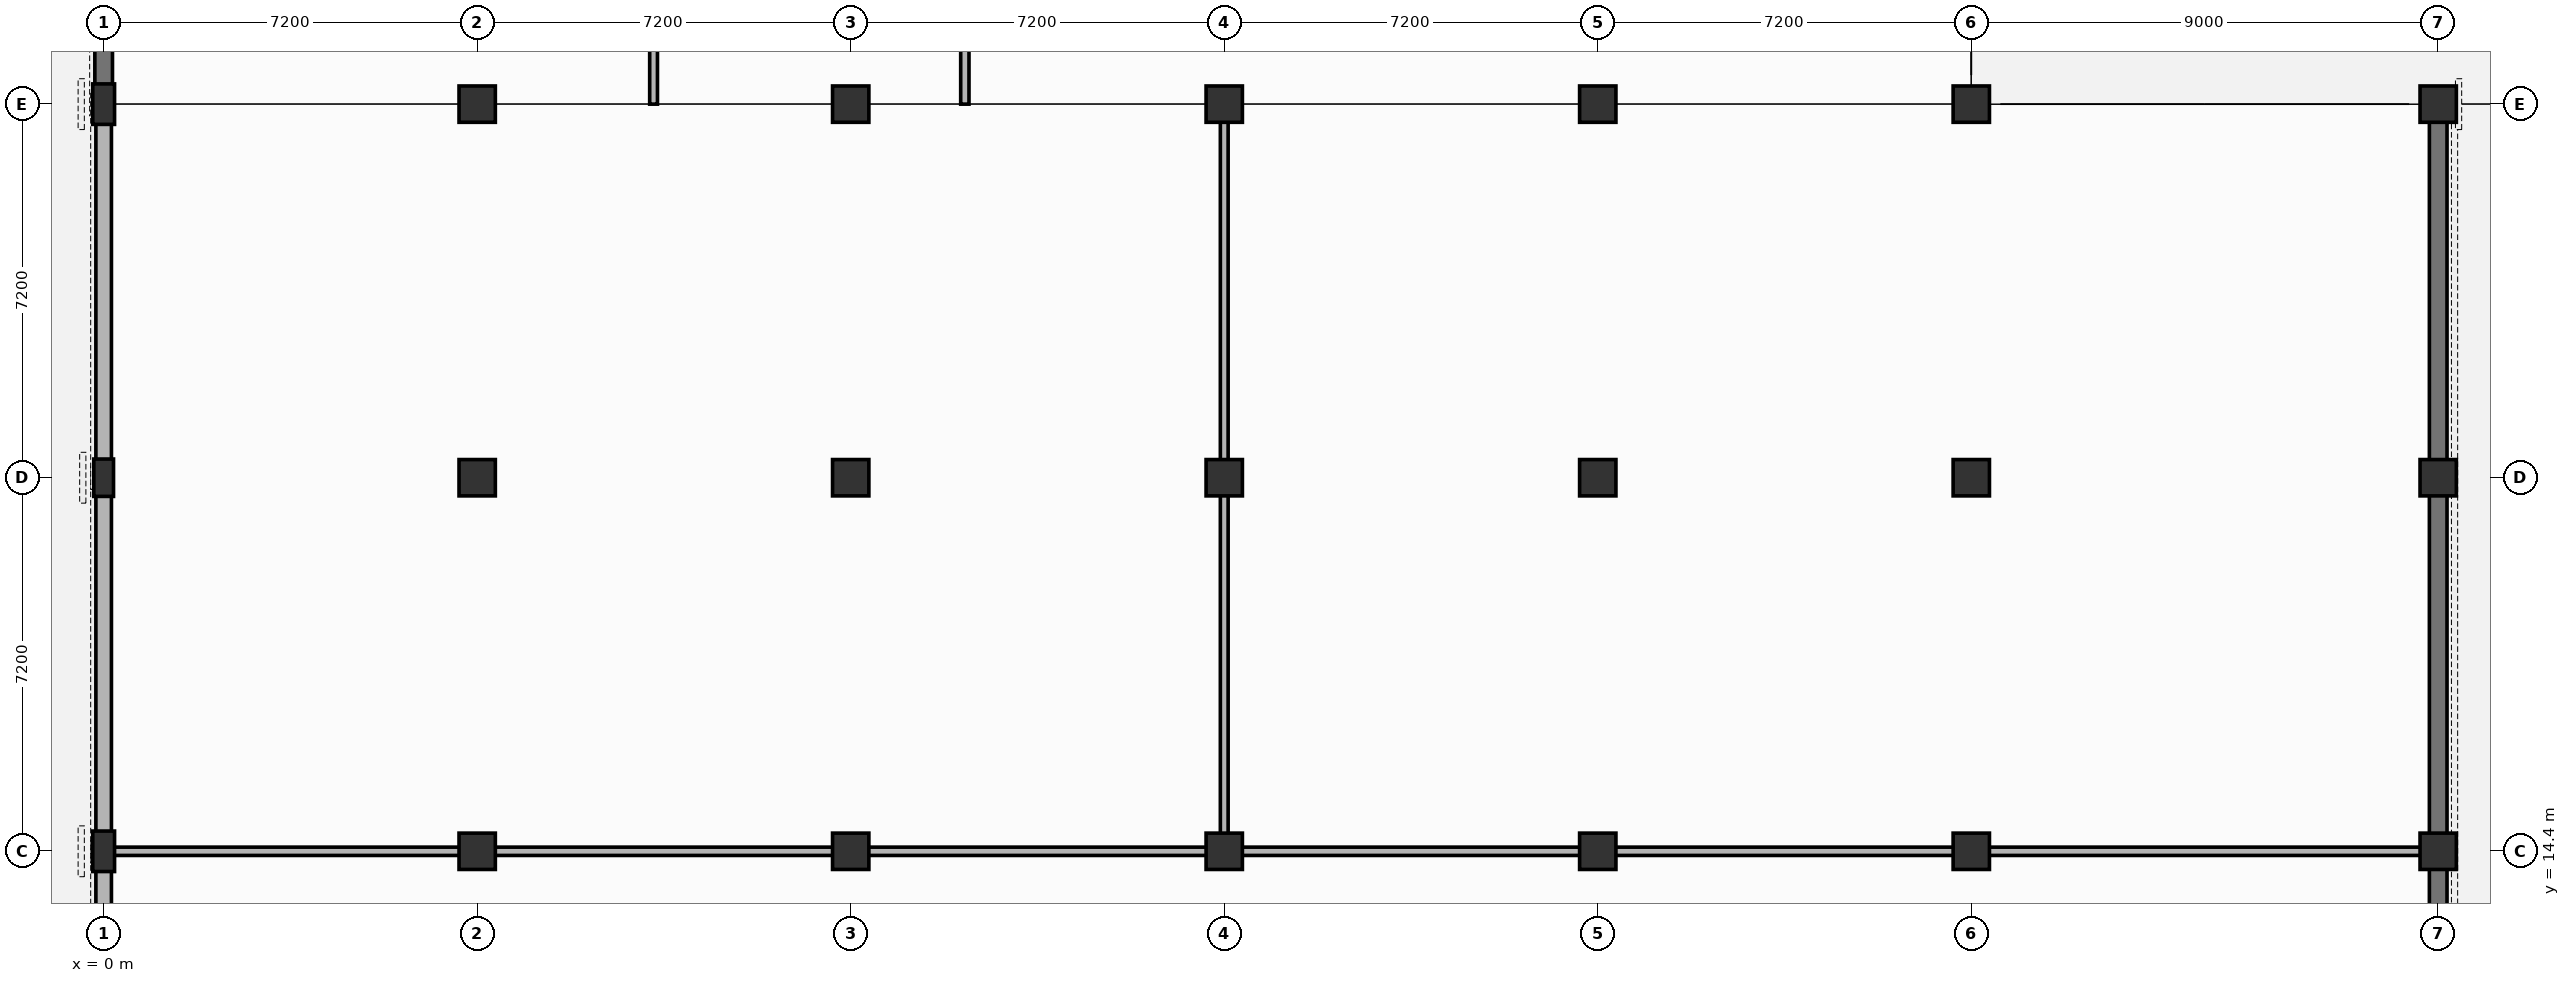
"""IFC4 building model, lengths in metres.
Left out: names, types, materials, properties, quantities, classifications, styles, units other than length and angle.
Written with IfcOpenShell. Run it as: python <this file> out.ifc"""

import sys

from ifc_helpers import new_model, si_unit, direction, frame, frame_2d, origin, origin_2d, place, context, subcontext, project, spatial, rectangle, extrude, element, fill, save


model = new_model("IFC4")
c1 = context("Model", 3, precision=1e-05, world=origin(), true_north=direction((0.0, 1.0)))
c2 = subcontext(c1, "Body", "Model", "MODEL_VIEW")
j1 = project(units=[si_unit("LENGTHUNIT", "METRE"), si_unit("PLANEANGLEUNIT", "RADIAN")], contexts=[c1])
p1 = place(None, origin())
s1 = spatial("IfcSite", under=j1, at=p1, CompositionType="ELEMENT")
p2 = place(p1, origin())
s2 = spatial("IfcBuilding", under=s1, at=p2, CompositionType="ELEMENT")
p3 = place(p2, origin())
s3 = spatial("IfcBuildingStorey", under=s2, at=p3, CompositionType="ELEMENT", Elevation=0.0)
p4 = place(p3, frame((0.0, 14.4, 0.0), z_axis=(0.0, 0.0, 1.0), x_axis=(1.0, 0.0, 0.0)))
e1 = element("IfcColumn", 1, at=p4, inside=s3, PredefinedType="PILASTER", context=c2, shape_type="SweptSolid", body=[
    extrude(rectangle(XDim=0.42, YDim=0.78, at=origin_2d()), origin(), (0.0, 0.0, 1.0), 5.1),
])
p5 = place(p3, frame((0.0, 21.6, 0.0), z_axis=(0.0, 0.0, 1.0), x_axis=(1.0, 0.0, 0.0)))
e2 = element("IfcColumn", 2, at=p5, inside=s3, PredefinedType="PILASTER", context=c2, shape_type="SweptSolid", body=[
    extrude(rectangle(XDim=0.38, YDim=0.72, at=origin_2d()), origin(), (0.0, 0.0, 1.0), 5.1),
])
p6 = place(p3, frame((0.0, 28.8, 0.0), z_axis=(0.0, 0.0, 1.0), x_axis=(1.0, 0.0, 0.0)))
e3 = element("IfcColumn", 3, at=p6, inside=s3, PredefinedType="PILASTER", context=c2, shape_type="SweptSolid", body=[
    extrude(rectangle(XDim=0.42, YDim=0.78, at=origin_2d()), origin(), (0.0, 0.0, 1.0), 5.1),
])
for number, where, z_axis, x_axis in (
    (4, (7.2, 14.4, 0.0), (0.0, 0.0, 1.0), (1.0, 0.0, 0.0)),
    (5, (7.2, 21.6, 0.0), (0.0, 0.0, 1.0), (1.0, 0.0, 0.0)),
    (6, (7.2, 28.8, 0.0), (0.0, 0.0, 1.0), (1.0, 0.0, 0.0)),
    (7, (14.4, 14.4, 0.0), (0.0, 0.0, 1.0), (1.0, 0.0, 0.0)),
    (8, (14.4, 21.6, 0.0), (0.0, 0.0, 1.0), (1.0, 0.0, 0.0)),
    (9, (14.4, 28.8, 0.0), (0.0, 0.0, 1.0), (1.0, 0.0, 0.0)),
    (10, (21.6, 14.4, 0.0), (0.0, 0.0, 1.0), (1.0, 0.0, 0.0)),
    (11, (21.6, 21.6, 0.0), (0.0, 0.0, 1.0), (1.0, 0.0, 0.0)),
    (12, (21.6, 28.8, 0.0), (0.0, 0.0, 1.0), (1.0, 0.0, 0.0)),
    (13, (28.8, 14.4, 0.0), (0.0, 0.0, 1.0), (1.0, 0.0, 0.0)),
    (14, (28.8, 21.6, 0.0), (0.0, 0.0, 1.0), (1.0, 0.0, 0.0)),
    (15, (28.8, 28.8, 0.0), (0.0, 0.0, 1.0), (1.0, 0.0, 0.0)),
    (16, (36.0, 14.4, 0.0), (0.0, 0.0, 1.0), (1.0, 0.0, 0.0)),
    (17, (36.0, 21.6, 0.0), (0.0, 0.0, 1.0), (1.0, 0.0, 0.0)),
    (18, (36.0, 28.8, 0.0), (0.0, 0.0, 1.0), (1.0, 0.0, 0.0)),
    (19, (45.0, 14.4, 0.0), (0.0, 0.0, 1.0), (1.0, 0.0, 0.0)),
    (20, (45.0, 21.6, 0.0), (0.0, 0.0, 1.0), (1.0, 0.0, 0.0)),
    (21, (45.0, 28.8, 0.0), (0.0, 0.0, 1.0), (1.0, 0.0, 0.0)),
):
    element("IfcColumn", number, at=place(p3, frame(where, z_axis=z_axis, x_axis=x_axis)), inside=s3, PredefinedType="COLUMN", context=c2, shape_type="SweptSolid", body=[
        extrude(rectangle(XDim=0.7, YDim=0.7, at=origin_2d()), origin(), (0.0, 0.0, 1.0), 5.1),
    ])
p7 = place(p3, frame((0.0, 28.8, 0.0), z_axis=(0.0, 0.0, 1.0), x_axis=(0.0, 1.0, 0.0)))
e22 = element("IfcWall", 22, at=p7, inside=s3, PredefinedType="SOLIDWALL", context=c2, shape_type="SweptSolid", body=[
    extrude(rectangle(XDim=7.2, YDim=0.34, at=frame_2d((3.6, 0.0))), origin(), (0.0, 0.0, 1.0), 4.8),
])
p8 = place(p7, frame((1.5, 0.0, 0.85)))
e23 = element("IfcOpeningElement", 23, at=p8, cuts=e22, PredefinedType="OPENING", context=c2, shape_type="SweptSolid", body=[
    extrude(rectangle(XDim=1.65, YDim=2.25, at=frame_2d((0.825, 1.125))), frame((0.0, 0.18, 0.0), z_axis=(0.0, -1.0, 0.0), x_axis=(1.0, 0.0, 0.0)), (0.0, 0.0, 1.0), 0.36),
])
p9 = place(p7, frame((4.3, 0.0, 0.85)))
e24 = element("IfcOpeningElement", 24, at=p9, cuts=e22, PredefinedType="OPENING", context=c2, shape_type="SweptSolid", body=[
    extrude(rectangle(XDim=1.65, YDim=2.25, at=frame_2d((0.825, 1.125))), frame((0.0, 0.18, 0.0), z_axis=(0.0, -1.0, 0.0), x_axis=(1.0, 0.0, 0.0)), (0.0, 0.0, 1.0), 0.36),
])
p10 = place(p3, frame((0.0, 7.2, 0.0), z_axis=(0.0, 0.0, 1.0), x_axis=(0.0, 1.0, 0.0)))
e25 = element("IfcWall", 25, at=p10, inside=s3, PredefinedType="SOLIDWALL", context=c2, shape_type="SweptSolid", body=[
    extrude(rectangle(XDim=7.2, YDim=0.3, at=frame_2d((3.6, 0.0))), origin(), (0.0, 0.0, 1.0), 4.115),
])
p11 = place(p10, frame((4.2, 0.0, 0.9)))
e26 = element("IfcOpeningElement", 26, at=p11, cuts=e25, PredefinedType="OPENING", context=c2, shape_type="SweptSolid", body=[
    extrude(rectangle(XDim=2.4, YDim=2.4, at=frame_2d((1.2, 1.2))), frame((0.0, 0.16, 0.0), z_axis=(0.0, -1.0, 0.0), x_axis=(1.0, 0.0, 0.0)), (0.0, 0.0, 1.0), 0.32),
])
p12 = place(p3, frame((0.0, 14.4, 0.0), z_axis=(0.0, 0.0, 1.0), x_axis=(0.0, 1.0, 0.0)))
e27 = element("IfcWall", 27, at=p12, inside=s3, PredefinedType="SOLIDWALL", context=c2, shape_type="SweptSolid", body=[
    extrude(rectangle(XDim=7.2, YDim=0.3, at=frame_2d((3.6, 0.0))), origin(), (0.0, 0.0, 1.0), 4.115),
])
p13 = place(p12, frame((2.0, 0.0, 0.9)))
e28 = element("IfcOpeningElement", 28, at=p13, cuts=e27, PredefinedType="OPENING", context=c2, shape_type="SweptSolid", body=[
    extrude(rectangle(XDim=2.4, YDim=2.4, at=frame_2d((1.2, 1.2))), frame((0.0, 0.16, 0.0), z_axis=(0.0, -1.0, 0.0), x_axis=(1.0, 0.0, 0.0)), (0.0, 0.0, 1.0), 0.32),
])
p14 = place(p3, frame((0.0, 21.6, 0.0), z_axis=(0.0, 0.0, 1.0), x_axis=(0.0, 1.0, 0.0)))
e29 = element("IfcWall", 29, at=p14, inside=s3, PredefinedType="SOLIDWALL", context=c2, shape_type="SweptSolid", body=[
    extrude(rectangle(XDim=7.2, YDim=0.3, at=frame_2d((3.6, 0.0))), origin(), (0.0, 0.0, 1.0), 4.115),
])
p15 = place(p14, frame((2.0, 0.0, 0.9)))
e30 = element("IfcOpeningElement", 30, at=p15, cuts=e29, PredefinedType="OPENING", context=c2, shape_type="SweptSolid", body=[
    extrude(rectangle(XDim=2.4, YDim=2.4, at=frame_2d((1.2, 1.2))), frame((0.0, 0.16, 0.0), z_axis=(0.0, -1.0, 0.0), x_axis=(1.0, 0.0, 0.0)), (0.0, 0.0, 1.0), 0.32),
])
p16 = place(p3, frame((45.0, 0.0, 0.0), z_axis=(0.0, 0.0, 1.0), x_axis=(0.0, 1.0, 0.0)))
e31 = element("IfcWall", 31, at=p16, inside=s3, PredefinedType="SOLIDWALL", context=c2, shape_type="SweptSolid", body=[
    extrude(rectangle(XDim=28.8, YDim=0.34, at=frame_2d((14.4, 0.0))), origin(), (0.0, 0.0, 1.0), 4.8),
])
p17 = place(p16, frame((18.5, 0.0, 0.0)))
e32 = element("IfcOpeningElement", 32, at=p17, cuts=e31, PredefinedType="OPENING", context=c2, shape_type="SweptSolid", body=[
    extrude(rectangle(XDim=1.6, YDim=2.4, at=frame_2d((0.8, 1.2))), frame((0.0, 0.18, 0.0), z_axis=(0.0, -1.0, 0.0), x_axis=(1.0, 0.0, 0.0)), (0.0, 0.0, 1.0), 0.36),
])
p18 = place(p16, frame((2.8, 0.0, 0.9)))
e33 = element("IfcOpeningElement", 33, at=p18, cuts=e31, PredefinedType="OPENING", context=c2, shape_type="SweptSolid", body=[
    extrude(rectangle(XDim=2.4, YDim=2.4, at=frame_2d((1.2, 1.2))), frame((0.0, 0.18, 0.0), z_axis=(0.0, -1.0, 0.0), x_axis=(1.0, 0.0, 0.0)), (0.0, 0.0, 1.0), 0.36),
])
p19 = place(p16, frame((15.2, 0.0, 0.9)))
e34 = element("IfcOpeningElement", 34, at=p19, cuts=e31, PredefinedType="OPENING", context=c2, shape_type="SweptSolid", body=[
    extrude(rectangle(XDim=1.6, YDim=2.05, at=frame_2d((0.8, 1.025))), frame((0.0, 0.18, 0.0), z_axis=(0.0, -1.0, 0.0), x_axis=(1.0, 0.0, 0.0)), (0.0, 0.0, 1.0), 0.36),
])
p20 = place(p3, frame((16.6, 28.8, 0.0), z_axis=(0.0, 0.0, 1.0), x_axis=(0.0, 1.0, 0.0)))
e35 = element("IfcWall", 35, at=p20, inside=s3, PredefinedType="PARTITIONING", context=c2, shape_type="SweptSolid", body=[
    extrude(rectangle(XDim=14.4, YDim=0.16, at=frame_2d((7.2, 0.0))), origin(), (0.0, 0.0, 1.0), 4.348),
])
p21 = place(p20, frame((6.4, 0.0, 0.0)))
e36 = element("IfcOpeningElement", 36, at=p21, cuts=e35, PredefinedType="OPENING", context=c2, shape_type="SweptSolid", body=[
    extrude(rectangle(XDim=1.6, YDim=2.2, at=frame_2d((0.8, 1.1))), frame((0.0, 0.09, 0.0), z_axis=(0.0, -1.0, 0.0), x_axis=(1.0, 0.0, 0.0)), (0.0, 0.0, 1.0), 0.18),
])
p22 = place(p3, frame((10.6, 28.8, 0.0), z_axis=(0.0, 0.0, 1.0), x_axis=(0.0, 1.0, 0.0)))
e37 = element("IfcWall", 37, at=p22, inside=s3, PredefinedType="PARTITIONING", context=c2, shape_type="SweptSolid", body=[
    extrude(rectangle(XDim=27.2, YDim=0.15, at=frame_2d((13.6, 0.0))), origin(), (0.0, 0.0, 1.0), 4.459),
])
p23 = place(p22, frame((11.0, 0.0, 0.0)))
e38 = element("IfcOpeningElement", 38, at=p23, cuts=e37, PredefinedType="OPENING", context=c2, shape_type="SweptSolid", body=[
    extrude(rectangle(XDim=1.0, YDim=2.15, at=frame_2d((0.5, 1.075))), frame((0.0, 0.085, 0.0), z_axis=(0.0, -1.0, 0.0), x_axis=(1.0, 0.0, 0.0)), (0.0, 0.0, 1.0), 0.17),
])
p24 = place(p3, frame((0.0, 14.4, 0.0), z_axis=(0.0, 0.0, 1.0), x_axis=(1.0, 0.0, 0.0)))
e39 = element("IfcWall", 39, at=p24, inside=s3, PredefinedType="PARTITIONING", context=c2, shape_type="SweptSolid", body=[
    extrude(rectangle(XDim=45.0, YDim=0.16, at=frame_2d((22.5, 0.0))), origin(), (0.0, 0.0, 1.0), 4.065),
])
p25 = place(p24, frame((10.0, 0.0, 0.0)))
e40 = element("IfcOpeningElement", 40, at=p25, cuts=e39, PredefinedType="OPENING", context=c2, shape_type="SweptSolid", body=[
    extrude(rectangle(XDim=1.6, YDim=2.2, at=frame_2d((0.8, 1.1))), frame((0.0, 0.09, 0.0), z_axis=(0.0, -1.0, 0.0), x_axis=(1.0, 0.0, 0.0)), (0.0, 0.0, 1.0), 0.18),
])
p26 = place(p24, frame((31.0, 0.0, 0.0)))
e41 = element("IfcOpeningElement", 41, at=p26, cuts=e39, PredefinedType="OPENING", context=c2, shape_type="SweptSolid", body=[
    extrude(rectangle(XDim=1.6, YDim=2.2, at=frame_2d((0.8, 1.1))), frame((0.0, 0.09, 0.0), z_axis=(0.0, -1.0, 0.0), x_axis=(1.0, 0.0, 0.0)), (0.0, 0.0, 1.0), 0.18),
])
p27 = place(p3, frame((21.6, 14.4, 0.0), z_axis=(0.0, 0.0, 1.0), x_axis=(0.0, 1.0, 0.0)))
e42 = element("IfcWall", 42, at=p27, inside=s3, PredefinedType="PARTITIONING", context=c2, shape_type="SweptSolid", body=[
    extrude(rectangle(XDim=14.4, YDim=0.15, at=frame_2d((7.2, 0.0))), origin(), (0.0, 0.0, 1.0), 4.015),
])
p28 = place(p11, origin())
e43 = element("IfcWindow", 43, at=p28, inside=s3, PartitioningType="SINGLE_PANEL", PredefinedType="WINDOW", context=c2, shape_type="SweptSolid", body=[
    extrude(rectangle(XDim=2.4, YDim=2.4, at=frame_2d((1.2, 1.2))), frame((0.0, 0.03, 0.0), z_axis=(0.0, -1.0, 0.0), x_axis=(1.0, 0.0, 0.0)), (0.0, 0.0, 1.0), 0.06),
])
fill(e26, e43)
p29 = place(p13, origin())
e44 = element("IfcWindow", 44, at=p29, inside=s3, PartitioningType="SINGLE_PANEL", PredefinedType="WINDOW", context=c2, shape_type="SweptSolid", body=[
    extrude(rectangle(XDim=2.4, YDim=2.4, at=frame_2d((1.2, 1.2))), frame((0.0, 0.03, 0.0), z_axis=(0.0, -1.0, 0.0), x_axis=(1.0, 0.0, 0.0)), (0.0, 0.0, 1.0), 0.06),
])
fill(e28, e44)
p30 = place(p15, origin())
e45 = element("IfcWindow", 45, at=p30, inside=s3, PartitioningType="SINGLE_PANEL", PredefinedType="WINDOW", context=c2, shape_type="SweptSolid", body=[
    extrude(rectangle(XDim=2.4, YDim=2.4, at=frame_2d((1.2, 1.2))), frame((0.0, 0.03, 0.0), z_axis=(0.0, -1.0, 0.0), x_axis=(1.0, 0.0, 0.0)), (0.0, 0.0, 1.0), 0.06),
])
fill(e30, e45)
p31 = place(p17, frame((1.6, 0.0, 0.0), z_axis=(0.0, 0.0, 1.0), x_axis=(-1.0, 0.0, 0.0)))
e46 = element("IfcDoor", 46, at=p31, inside=s3, OperationType="DOUBLE_DOOR_SINGLE_SWING", PredefinedType="DOOR", context=c2, shape_type="SweptSolid", body=[
    extrude(rectangle(XDim=1.6, YDim=2.4, at=frame_2d((0.8, 1.2))), frame((0.0, 0.025, 0.0), z_axis=(0.0, -1.0, 0.0), x_axis=(1.0, 0.0, 0.0)), (0.0, 0.0, 1.0), 0.05),
])
fill(e32, e46)
p32 = place(p19, origin())
e47 = element("IfcWindow", 47, at=p32, inside=s3, PartitioningType="SINGLE_PANEL", PredefinedType="WINDOW", context=c2, shape_type="SweptSolid", body=[
    extrude(rectangle(XDim=1.6, YDim=2.05, at=frame_2d((0.8, 1.025))), frame((0.0, 0.03, 0.0), z_axis=(0.0, -1.0, 0.0), x_axis=(1.0, 0.0, 0.0)), (0.0, 0.0, 1.0), 0.06),
])
fill(e34, e47)
p33 = place(p25, origin())
e48 = element("IfcDoor", 48, at=p33, inside=s3, OperationType="DOUBLE_DOOR_SINGLE_SWING", PredefinedType="DOOR", context=c2, shape_type="SweptSolid", body=[
    extrude(rectangle(XDim=1.6, YDim=2.2, at=frame_2d((0.8, 1.1))), frame((0.0, 0.025, 0.0), z_axis=(0.0, -1.0, 0.0), x_axis=(1.0, 0.0, 0.0)), (0.0, 0.0, 1.0), 0.05),
])
fill(e40, e48)
p34 = place(p26, origin())
e49 = element("IfcDoor", 49, at=p34, inside=s3, OperationType="DOUBLE_DOOR_SINGLE_SWING", PredefinedType="DOOR", context=c2, shape_type="SweptSolid", body=[
    extrude(rectangle(XDim=1.6, YDim=2.2, at=frame_2d((0.8, 1.1))), frame((0.0, 0.025, 0.0), z_axis=(0.0, -1.0, 0.0), x_axis=(1.0, 0.0, 0.0)), (0.0, 0.0, 1.0), 0.05),
])
fill(e41, e49)
save(model, sys.argv[1])
